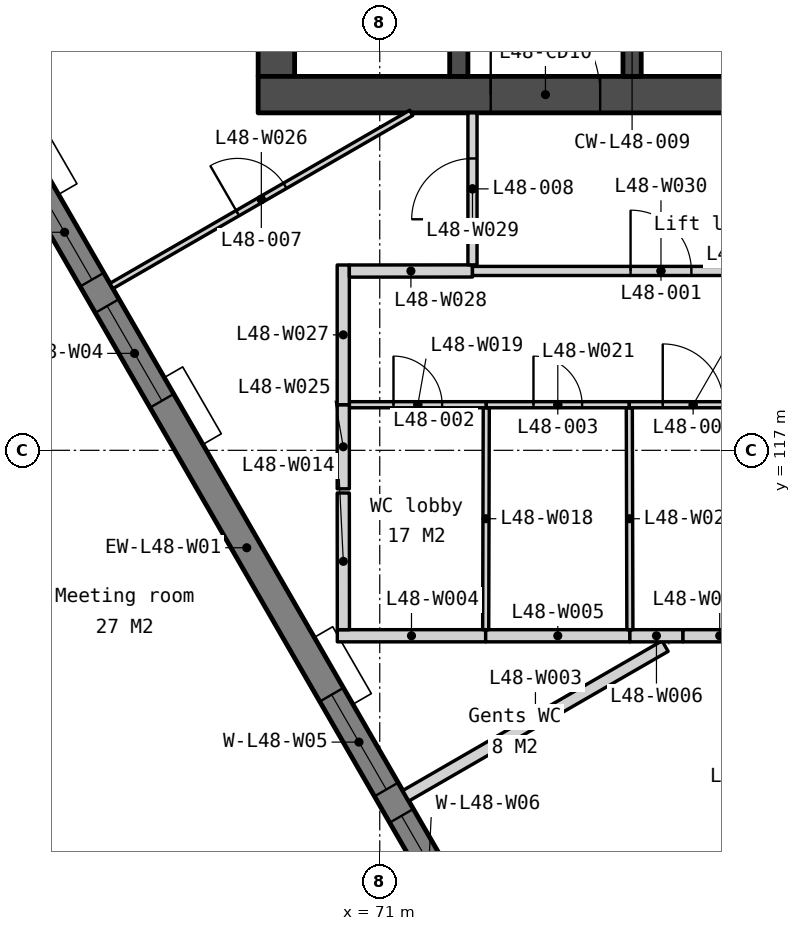
"""IFC4 building model, lengths in metres.
Left out: names, types, materials, properties, quantities, classifications, styles, units other than length and angle.
Written with IfcOpenShell. Run it as: python <this file> out.ifc"""

import sys

from ifc_helpers import new_model, si_unit, direction, frame, frame_2d, origin, place, context, subcontext, project, spatial, polyline, rectangle, outline, extrude, element, fill, save


model = new_model("IFC4")
c1 = context("Model", 3, precision=1e-05, world=origin(), true_north=direction((0.0, 1.0)))
c2 = subcontext(c1, "Body", "Model", "MODEL_VIEW")
j1 = project(units=[si_unit("LENGTHUNIT", "METRE"), si_unit("PLANEANGLEUNIT", "RADIAN")], contexts=[c1])
p1 = place(None, origin())
s1 = spatial("IfcSite", under=j1, at=p1, CompositionType="ELEMENT")
p2 = place(p1, origin())
s2 = spatial("IfcBuilding", under=s1, at=p2, CompositionType="ELEMENT")
p3 = place(p2, frame((0.0, 0.0, 191.9)))
s3 = spatial("IfcBuildingStorey", under=s2, at=p3, CompositionType="ELEMENT", Elevation=191.9)
p4 = place(p3, frame((69.3, 133.95, 0.0), z_axis=(0.0, 0.0, 1.0), x_axis=(0.0, -1.0, 0.0)))
e1 = element("IfcWall", 1, at=p4, inside=s3, PredefinedType="SOLIDWALL", context=c2, shape_type="SweptSolid", body=[
    extrude(rectangle(XDim=10.8, YDim=0.6, at=frame_2d((5.4, 0.0))), origin(), (0.0, 0.0, 1.0), 3.75),
])
p5 = place(p3, frame((69.0, 122.85, 0.0), z_axis=(0.0, 0.0, 1.0), x_axis=(1.0, 0.0, 0.0)))
e2 = element("IfcWall", 2, at=p5, inside=s3, PredefinedType="SOLIDWALL", context=c2, shape_type="SweptSolid", body=[
    extrude(rectangle(XDim=22.0, YDim=0.6, at=frame_2d((11.0, 0.0))), origin(), (0.0, 0.0, 1.0), 3.75),
])
p6 = place(p5, frame((16.375, 0.0, 0.0)))
e3 = element("IfcOpeningElement", 3, at=p6, cuts=e2, PredefinedType="OPENING", context=c2, shape_type="SweptSolid", body=[
    extrude(rectangle(XDim=1.8, YDim=2.1, at=frame_2d((0.9, 1.05))), frame((0.0, 0.31, 0.0), z_axis=(0.0, -1.0, 0.0), x_axis=(1.0, 0.0, 0.0)), (0.0, 0.0, 1.0), 0.62),
])
p7 = place(p5, frame((3.825, 0.0, 0.0)))
e4 = element("IfcOpeningElement", 4, at=p7, cuts=e2, PredefinedType="OPENING", context=c2, shape_type="SweptSolid", body=[
    extrude(rectangle(XDim=1.8, YDim=2.1, at=frame_2d((0.9, 1.05))), frame((0.0, 0.31, 0.0), z_axis=(0.0, -1.0, 0.0), x_axis=(1.0, 0.0, 0.0)), (0.0, 0.0, 1.0), 0.62),
])
p8 = place(p5, frame((12.85, 0.0, 0.0)))
e5 = element("IfcOpeningElement", 5, at=p8, cuts=e2, PredefinedType="OPENING", context=c2, shape_type="SweptSolid", body=[
    extrude(rectangle(XDim=1.5, YDim=2.1, at=frame_2d((0.75, 1.05))), frame((0.0, 0.31, 0.0), z_axis=(0.0, -1.0, 0.0), x_axis=(1.0, 0.0, 0.0)), (0.0, 0.0, 1.0), 0.62),
])
p9 = place(p3, frame((72.3, 133.95, 0.0), z_axis=(0.0, 0.0, 1.0), x_axis=(0.0, -1.0, 0.0)))
e6 = element("IfcWall", 6, at=p9, inside=s3, PredefinedType="SOLIDWALL", context=c2, shape_type="SweptSolid", body=[
    extrude(rectangle(XDim=10.8, YDim=0.3, at=frame_2d((5.4, 0.0))), origin(), (0.0, 0.0, 1.0), 3.75),
])
p10 = place(p9, frame((6.95, 0.0, 0.0)))
e7 = element("IfcOpeningElement", 7, at=p10, cuts=e6, PredefinedType="OPENING", context=c2, shape_type="SweptSolid", body=[
    extrude(rectangle(XDim=1.1, YDim=2.1, at=frame_2d((0.55, 1.05))), frame((0.0, 0.16, 0.0), z_axis=(0.0, -1.0, 0.0), x_axis=(1.0, 0.0, 0.0)), (0.0, 0.0, 1.0), 0.32),
])
p11 = place(p9, frame((9.35, 0.0, 0.0)))
e8 = element("IfcOpeningElement", 8, at=p11, cuts=e6, PredefinedType="OPENING", context=c2, shape_type="SweptSolid", body=[
    extrude(rectangle(XDim=0.9, YDim=2.1, at=frame_2d((0.45, 1.05))), frame((0.0, 0.16, 0.0), z_axis=(0.0, -1.0, 0.0), x_axis=(1.0, 0.0, 0.0)), (0.0, 0.0, 1.0), 0.32),
])
p12 = place(p9, frame((5.1, 0.0, 0.0)))
e9 = element("IfcOpeningElement", 9, at=p12, cuts=e6, PredefinedType="OPENING", context=c2, shape_type="SweptSolid", body=[
    extrude(rectangle(XDim=1.0, YDim=2.1, at=frame_2d((0.5, 1.05))), frame((0.0, 0.16, 0.0), z_axis=(0.0, -1.0, 0.0), x_axis=(1.0, 0.0, 0.0)), (0.0, 0.0, 1.0), 0.32),
])
p13 = place(p3, frame((75.15, 125.7, 0.0), z_axis=(0.0, 0.0, 1.0), x_axis=(0.0, -1.0, 0.0)))
e10 = element("IfcWall", 10, at=p13, inside=s3, PredefinedType="SOLIDWALL", context=c2, shape_type="SweptSolid", body=[
    extrude(rectangle(XDim=2.55, YDim=0.3, at=frame_2d((1.275, 0.0))), origin(), (0.0, 0.0, 1.0), 3.75),
])
p14 = place(p3, frame((59.13, 132.168, -0.15), z_axis=(0.0, 0.0, 1.0), x_axis=(0.500002199942, -0.866024133644, 0.0)))
e11 = element("IfcWall", 11, at=p14, inside=s3, PredefinedType="SOLIDWALL", context=c2, shape_type="SweptSolid", body=[
    extrude(outline(polyline([(38.729, 0.0), (38.729, 3.9), (0.0, 3.9), (0.0, 0.0), (38.729, 0.0)])), frame((0.0, 0.225, 0.0), z_axis=(0.0, -1.0, 0.0), x_axis=(1.0, 0.0, 0.0)), (0.0, 0.0, 1.0), 0.45),
])
p15 = place(p14, frame((2.791, 0.0, 0.95)))
e12 = element("IfcOpeningElement", 12, at=p15, cuts=e11, PredefinedType="OPENING", context=c2, shape_type="SweptSolid", body=[
    extrude(rectangle(XDim=1.8, YDim=2.2, at=frame_2d((0.9, 1.1))), frame((0.0, 0.235, 0.0), z_axis=(0.0, -1.0, 0.0), x_axis=(1.0, 0.0, 0.0)), (0.0, 0.0, 1.0), 0.47),
])
p16 = place(p14, frame((5.091, 0.0, 0.95)))
e13 = element("IfcOpeningElement", 13, at=p16, cuts=e11, PredefinedType="OPENING", context=c2, shape_type="SweptSolid", body=[
    extrude(rectangle(XDim=1.8, YDim=2.2, at=frame_2d((0.9, 1.1))), frame((0.0, 0.235, 0.0), z_axis=(0.0, -1.0, 0.0), x_axis=(1.0, 0.0, 0.0)), (0.0, 0.0, 1.0), 0.47),
])
p17 = place(p14, frame((12.473, 0.0, 0.95)))
e14 = element("IfcOpeningElement", 14, at=p17, cuts=e11, PredefinedType="OPENING", context=c2, shape_type="SweptSolid", body=[
    extrude(rectangle(XDim=1.8, YDim=2.2, at=frame_2d((0.9, 1.1))), frame((0.0, 0.235, 0.0), z_axis=(0.0, -1.0, 0.0), x_axis=(1.0, 0.0, 0.0)), (0.0, 0.0, 1.0), 0.47),
])
p18 = place(p14, frame((14.773, 0.0, 0.95)))
e15 = element("IfcOpeningElement", 15, at=p18, cuts=e11, PredefinedType="OPENING", context=c2, shape_type="SweptSolid", body=[
    extrude(rectangle(XDim=1.8, YDim=2.2, at=frame_2d((0.9, 1.1))), frame((0.0, 0.235, 0.0), z_axis=(0.0, -1.0, 0.0), x_axis=(1.0, 0.0, 0.0)), (0.0, 0.0, 1.0), 0.47),
])
p19 = place(p14, frame((22.156, 0.0, 0.95)))
e16 = element("IfcOpeningElement", 16, at=p19, cuts=e11, PredefinedType="OPENING", context=c2, shape_type="SweptSolid", body=[
    extrude(rectangle(XDim=1.8, YDim=2.2, at=frame_2d((0.9, 1.1))), frame((0.0, 0.235, 0.0), z_axis=(0.0, -1.0, 0.0), x_axis=(1.0, 0.0, 0.0)), (0.0, 0.0, 1.0), 0.47),
])
p20 = place(p14, frame((24.456, 0.0, 0.95)))
e17 = element("IfcOpeningElement", 17, at=p20, cuts=e11, PredefinedType="OPENING", context=c2, shape_type="SweptSolid", body=[
    extrude(rectangle(XDim=1.8, YDim=2.2, at=frame_2d((0.9, 1.1))), frame((0.0, 0.235, 0.0), z_axis=(0.0, -1.0, 0.0), x_axis=(1.0, 0.0, 0.0)), (0.0, 0.0, 1.0), 0.47),
])
p21 = place(p14, frame((31.838, 0.0, 0.95)))
e18 = element("IfcOpeningElement", 18, at=p21, cuts=e11, PredefinedType="OPENING", context=c2, shape_type="SweptSolid", body=[
    extrude(rectangle(XDim=1.8, YDim=2.2, at=frame_2d((0.9, 1.1))), frame((0.0, 0.235, 0.0), z_axis=(0.0, -1.0, 0.0), x_axis=(1.0, 0.0, 0.0)), (0.0, 0.0, 1.0), 0.47),
])
p22 = place(p14, frame((34.138, 0.0, 0.95)))
e19 = element("IfcOpeningElement", 19, at=p22, cuts=e11, PredefinedType="OPENING", context=c2, shape_type="SweptSolid", body=[
    extrude(rectangle(XDim=1.8, YDim=2.2, at=frame_2d((0.9, 1.1))), frame((0.0, 0.235, 0.0), z_axis=(0.0, -1.0, 0.0), x_axis=(1.0, 0.0, 0.0)), (0.0, 0.0, 1.0), 0.47),
])
p23 = place(p3, frame((73.849, 107.125, 0.0), z_axis=(0.0, 0.0, 1.0), x_axis=(0.866035511351, 0.499982492772, 0.0)))
e20 = element("IfcWall", 20, at=p23, inside=s3, PredefinedType="PARTITIONING", context=c2, shape_type="SweptSolid", body=[
    extrude(rectangle(XDim=7.016, YDim=0.1, at=frame_2d((3.508, 0.0))), origin(), (0.0, 0.0, 1.0), 3.75),
])
p24 = place(p3, frame((71.428, 111.318, 0.0), z_axis=(0.0, 0.0, 1.0), x_axis=(0.86601964755, 0.500009969958, 0.0)))
e21 = element("IfcWall", 21, at=p24, inside=s3, PredefinedType="PARTITIONING", context=c2, shape_type="SweptSolid", body=[
    extrude(rectangle(XDim=4.925, YDim=0.2, at=frame_2d((2.462, 0.0))), origin(), (0.0, 0.0, 1.0), 3.75),
])
p25 = place(p3, frame((70.302, 113.95, 0.0), z_axis=(0.0, 0.0, 1.0), x_axis=(1.0, 0.0, 0.0)))
e22 = element("IfcWall", 22, at=p25, inside=s3, PredefinedType="PARTITIONING", context=c2, shape_type="SweptSolid", body=[
    extrude(rectangle(XDim=2.44, YDim=0.2, at=frame_2d((1.22, 0.0))), origin(), (0.0, 0.0, 1.0), 3.75),
])
p26 = place(p3, frame((72.742, 113.95, 0.0), z_axis=(0.0, 0.0, 1.0), x_axis=(1.0, 0.0, 0.0)))
e23 = element("IfcWall", 23, at=p26, inside=s3, PredefinedType="PARTITIONING", context=c2, shape_type="SweptSolid", body=[
    extrude(rectangle(XDim=2.372, YDim=0.2, at=frame_2d((1.186, 0.0))), origin(), (0.0, 0.0, 1.0), 3.75),
])
p27 = place(p3, frame((75.114, 113.95, 0.0), z_axis=(0.0, 0.0, 1.0), x_axis=(1.0, 0.0, 0.0)))
e24 = element("IfcWall", 24, at=p27, inside=s3, PredefinedType="PARTITIONING", context=c2, shape_type="SweptSolid", body=[
    extrude(rectangle(XDim=0.873, YDim=0.2, at=frame_2d((0.437, 0.0))), origin(), (0.0, 0.0, 1.0), 3.75),
])
p28 = place(p3, frame((75.987, 113.95, 0.0), z_axis=(0.0, 0.0, 1.0), x_axis=(1.0, 0.0, 0.0)))
e25 = element("IfcWall", 25, at=p28, inside=s3, PredefinedType="PARTITIONING", context=c2, shape_type="SweptSolid", body=[
    extrude(rectangle(XDim=1.207, YDim=0.2, at=frame_2d((0.604, 0.0))), origin(), (0.0, 0.0, 1.0), 3.75),
])
p29 = place(p3, frame((70.402, 114.05, 0.0), z_axis=(0.0, 0.0, 1.0), x_axis=(-0.000868809403, 0.999999622585, 0.0)))
e26 = element("IfcWall", 26, at=p29, inside=s3, PredefinedType="PARTITIONING", context=c2, shape_type="SweptSolid", body=[
    extrude(rectangle(XDim=2.248, YDim=0.2, at=frame_2d((1.124, 0.0))), origin(), (0.0, 0.0, 1.0), 3.75),
])
p30 = place(p3, frame((72.742, 114.05, 0.0), z_axis=(0.0, 0.0, 1.0), x_axis=(0.002675575707, 0.999996420641, 0.0)))
e27 = element("IfcWall", 27, at=p30, inside=s3, PredefinedType="PARTITIONING", context=c2, shape_type="SweptSolid", body=[
    extrude(rectangle(XDim=3.65, YDim=0.1, at=frame_2d((1.825, 0.0))), origin(), (0.0, 0.0, 1.0), 3.75),
])
p31 = place(p3, frame((70.5, 117.75, 0.0), z_axis=(0.0, 0.0, 1.0), x_axis=(1.0, 0.0, 0.0)))
e28 = element("IfcWall", 28, at=p31, inside=s3, PredefinedType="PARTITIONING", context=c2, shape_type="SweptSolid", body=[
    extrude(rectangle(XDim=2.252, YDim=0.1, at=frame_2d((1.126, 0.0))), origin(), (0.0, 0.0, 1.0), 3.75),
])
p32 = place(p31, frame((0.726, 0.0, 0.0)))
e29 = element("IfcOpeningElement", 29, at=p32, cuts=e28, PredefinedType="OPENING", context=c2, shape_type="SweptSolid", body=[
    extrude(rectangle(XDim=0.8, YDim=2.1, at=frame_2d((0.4, 1.05))), frame((0.0, 0.06, 0.0), z_axis=(0.0, -1.0, 0.0), x_axis=(1.0, 0.0, 0.0)), (0.0, 0.0, 1.0), 0.12),
])
p33 = place(p3, frame((75.114, 114.05, 0.0), z_axis=(0.0, 0.0, 1.0), x_axis=(-0.002608686776, 0.999996597371, 0.0)))
e30 = element("IfcWall", 30, at=p33, inside=s3, PredefinedType="PARTITIONING", context=c2, shape_type="SweptSolid", body=[
    extrude(rectangle(XDim=3.65, YDim=0.1, at=frame_2d((1.825, 0.0))), origin(), (0.0, 0.0, 1.0), 3.75),
])
p34 = place(p3, frame((72.752, 117.75, 0.0), z_axis=(0.0, 0.0, 1.0), x_axis=(1.0, 0.0, 0.0)))
e31 = element("IfcWall", 31, at=p34, inside=s3, PredefinedType="PARTITIONING", context=c2, shape_type="SweptSolid", body=[
    extrude(rectangle(XDim=2.352, YDim=0.1, at=frame_2d((1.176, 0.0))), origin(), (0.0, 0.0, 1.0), 3.75),
])
p35 = place(p34, frame((0.776, 0.0, 0.0)))
e32 = element("IfcOpeningElement", 32, at=p35, cuts=e31, PredefinedType="OPENING", context=c2, shape_type="SweptSolid", body=[
    extrude(rectangle(XDim=0.8, YDim=2.1, at=frame_2d((0.4, 1.05))), frame((0.0, 0.06, 0.0), z_axis=(0.0, -1.0, 0.0), x_axis=(1.0, 0.0, 0.0)), (0.0, 0.0, 1.0), 0.12),
])
p36 = place(p3, frame((75.104, 117.75, 0.0), z_axis=(0.0, 0.0, 1.0), x_axis=(1.0, 0.0, 0.0)))
e33 = element("IfcWall", 33, at=p36, inside=s3, PredefinedType="PARTITIONING", context=c2, shape_type="SweptSolid", body=[
    extrude(rectangle(XDim=2.1, YDim=0.1, at=frame_2d((1.05, 0.0))), origin(), (0.0, 0.0, 1.0), 3.75),
])
p37 = place(p36, frame((0.55, 0.0, 0.0)))
e34 = element("IfcOpeningElement", 34, at=p37, cuts=e33, PredefinedType="OPENING", context=c2, shape_type="SweptSolid", body=[
    extrude(rectangle(XDim=1.0, YDim=2.1, at=frame_2d((0.5, 1.05))), frame((0.0, 0.06, 0.0), z_axis=(0.0, -1.0, 0.0), x_axis=(1.0, 0.0, 0.0)), (0.0, 0.0, 1.0), 0.12),
])
p38 = place(p3, frame((70.4, 116.367, 0.0), z_axis=(0.0, 0.0, 1.0), x_axis=(0.0, 1.0, 0.0)))
e35 = element("IfcWall", 35, at=p38, inside=s3, PredefinedType="PARTITIONING", context=c2, shape_type="SweptSolid", body=[
    extrude(rectangle(XDim=1.383, YDim=0.2, at=frame_2d((0.692, 0.0))), origin(), (0.0, 0.0, 1.0), 3.75),
])
p39 = place(p3, frame((66.587, 119.703, 0.0), z_axis=(0.0, 0.0, 1.0), x_axis=(0.866023511746, 0.500003277092, 0.0)))
e36 = element("IfcWall", 36, at=p39, inside=s3, PredefinedType="PARTITIONING", context=c2, shape_type="SweptSolid", body=[
    extrude(rectangle(XDim=5.694, YDim=0.1, at=frame_2d((2.847, 0.0))), origin(), (0.0, 0.0, 1.0), 3.75),
])
p40 = place(p39, frame((2.397, 0.0, 0.0)))
e37 = element("IfcOpeningElement", 37, at=p40, cuts=e36, PredefinedType="OPENING", context=c2, shape_type="SweptSolid", body=[
    extrude(rectangle(XDim=0.9, YDim=2.1, at=frame_2d((0.45, 1.05))), frame((0.0, 0.06, 0.0), z_axis=(0.0, -1.0, 0.0), x_axis=(1.0, 0.0, 0.0)), (0.0, 0.0, 1.0), 0.12),
])
p41 = place(p3, frame((70.4, 117.75, 0.0), z_axis=(0.0, 0.0, 1.0), x_axis=(0.0, 1.0, 0.0)))
e38 = element("IfcWall", 38, at=p41, inside=s3, PredefinedType="PARTITIONING", context=c2, shape_type="SweptSolid", body=[
    extrude(rectangle(XDim=2.298, YDim=0.2, at=frame_2d((1.149, 0.0))), origin(), (0.0, 0.0, 1.0), 3.75),
])
p42 = place(p3, frame((70.5, 119.948, 0.0), z_axis=(0.0, 0.0, 1.0), x_axis=(0.999999534819, 0.00096455224, 0.0)))
e39 = element("IfcWall", 39, at=p42, inside=s3, PredefinedType="PARTITIONING", context=c2, shape_type="SweptSolid", body=[
    extrude(rectangle(XDim=2.025, YDim=0.2, at=frame_2d((1.012, 0.0))), origin(), (0.0, 0.0, 1.0), 3.75),
])
p43 = place(p3, frame((72.525, 120.05, 0.0), z_axis=(0.0, 0.0, 1.0), x_axis=(0.0, 1.0, 0.0)))
e40 = element("IfcWall", 40, at=p43, inside=s3, PredefinedType="PARTITIONING", context=c2, shape_type="SweptSolid", body=[
    extrude(rectangle(XDim=2.5, YDim=0.15, at=frame_2d((1.25, 0.0))), origin(), (0.0, 0.0, 1.0), 3.75),
])
p44 = place(p43, frame((0.75, 0.0, 0.0)))
e41 = element("IfcOpeningElement", 41, at=p44, cuts=e40, PredefinedType="OPENING", context=c2, shape_type="SweptSolid", body=[
    extrude(rectangle(XDim=1.0, YDim=2.1, at=frame_2d((0.5, 1.05))), frame((0.0, 0.085, 0.0), z_axis=(0.0, -1.0, 0.0), x_axis=(1.0, 0.0, 0.0)), (0.0, 0.0, 1.0), 0.17),
])
p45 = place(p3, frame((72.525, 119.95, 0.0), z_axis=(0.0, 0.0, 1.0), x_axis=(1.0, 0.0, 0.0)))
e42 = element("IfcWall", 42, at=p45, inside=s3, PredefinedType="PARTITIONING", context=c2, shape_type="SweptSolid", body=[
    extrude(rectangle(XDim=6.2, YDim=0.15, at=frame_2d((3.1, 0.0))), origin(), (0.0, 0.0, 1.0), 3.75),
])
p46 = place(p45, frame((2.6, 0.0, 0.0)))
e43 = element("IfcOpeningElement", 43, at=p46, cuts=e42, PredefinedType="OPENING", context=c2, shape_type="SweptSolid", body=[
    extrude(rectangle(XDim=1.0, YDim=2.1, at=frame_2d((0.5, 1.05))), frame((0.0, 0.085, 0.0), z_axis=(0.0, -1.0, 0.0), x_axis=(1.0, 0.0, 0.0)), (0.0, 0.0, 1.0), 0.17),
])
p47 = place(p7, origin())
e44 = element("IfcDoor", 44, at=p47, inside=s3, OperationType="DOUBLE_DOOR_DOUBLE_SWING", PredefinedType="DOOR", context=c2, shape_type="SweptSolid", body=[
    extrude(rectangle(XDim=1.8, YDim=2.1, at=frame_2d((0.9, 1.05))), frame((0.0, 0.025, 0.0), z_axis=(0.0, -1.0, 0.0), x_axis=(1.0, 0.0, 0.0)), (0.0, 0.0, 1.0), 0.05),
])
fill(e4, e44)
p48 = place(p17, origin())
e45 = element("IfcWindow", 45, at=p48, inside=s3, PartitioningType="SINGLE_PANEL", PredefinedType="WINDOW", context=c2, shape_type="SweptSolid", body=[
    extrude(rectangle(XDim=1.8, YDim=2.2, at=frame_2d((0.9, 1.1))), frame((0.0, 0.03, 0.0), z_axis=(0.0, -1.0, 0.0), x_axis=(1.0, 0.0, 0.0)), (0.0, 0.0, 1.0), 0.06),
])
fill(e14, e45)
p49 = place(p18, origin())
e46 = element("IfcWindow", 46, at=p49, inside=s3, PartitioningType="SINGLE_PANEL", PredefinedType="WINDOW", context=c2, shape_type="SweptSolid", body=[
    extrude(rectangle(XDim=1.8, YDim=2.2, at=frame_2d((0.9, 1.1))), frame((0.0, 0.03, 0.0), z_axis=(0.0, -1.0, 0.0), x_axis=(1.0, 0.0, 0.0)), (0.0, 0.0, 1.0), 0.06),
])
fill(e15, e46)
p50 = place(p19, origin())
e47 = element("IfcWindow", 47, at=p50, inside=s3, PartitioningType="SINGLE_PANEL", PredefinedType="WINDOW", context=c2, shape_type="SweptSolid", body=[
    extrude(rectangle(XDim=1.8, YDim=2.2, at=frame_2d((0.9, 1.1))), frame((0.0, 0.03, 0.0), z_axis=(0.0, -1.0, 0.0), x_axis=(1.0, 0.0, 0.0)), (0.0, 0.0, 1.0), 0.06),
])
fill(e16, e47)
p51 = place(p20, origin())
e48 = element("IfcWindow", 48, at=p51, inside=s3, PartitioningType="SINGLE_PANEL", PredefinedType="WINDOW", context=c2, shape_type="SweptSolid", body=[
    extrude(rectangle(XDim=1.8, YDim=2.2, at=frame_2d((0.9, 1.1))), frame((0.0, 0.03, 0.0), z_axis=(0.0, -1.0, 0.0), x_axis=(1.0, 0.0, 0.0)), (0.0, 0.0, 1.0), 0.06),
])
fill(e17, e48)
p52 = place(p46, origin())
e49 = element("IfcDoor", 49, at=p52, inside=s3, OperationType="SINGLE_SWING_LEFT", PredefinedType="DOOR", context=c2, shape_type="SweptSolid", body=[
    extrude(rectangle(XDim=1.0, YDim=2.1, at=frame_2d((0.5, 1.05))), frame((0.0, 0.025, 0.0), z_axis=(0.0, -1.0, 0.0), x_axis=(1.0, 0.0, 0.0)), (0.0, 0.0, 1.0), 0.05),
])
fill(e43, e49)
p53 = place(p32, origin())
e50 = element("IfcDoor", 50, at=p53, inside=s3, OperationType="SINGLE_SWING_LEFT", PredefinedType="DOOR", context=c2, shape_type="SweptSolid", body=[
    extrude(rectangle(XDim=0.8, YDim=2.1, at=frame_2d((0.4, 1.05))), frame((0.0, 0.025, 0.0), z_axis=(0.0, -1.0, 0.0), x_axis=(1.0, 0.0, 0.0)), (0.0, 0.0, 1.0), 0.05),
])
fill(e29, e50)
p54 = place(p35, origin())
e51 = element("IfcDoor", 51, at=p54, inside=s3, OperationType="SINGLE_SWING_LEFT", PredefinedType="DOOR", context=c2, shape_type="SweptSolid", body=[
    extrude(rectangle(XDim=0.8, YDim=2.1, at=frame_2d((0.4, 1.05))), frame((0.0, 0.025, 0.0), z_axis=(0.0, -1.0, 0.0), x_axis=(1.0, 0.0, 0.0)), (0.0, 0.0, 1.0), 0.05),
])
fill(e32, e51)
p55 = place(p37, origin())
e52 = element("IfcDoor", 52, at=p55, inside=s3, OperationType="SINGLE_SWING_LEFT", PredefinedType="DOOR", context=c2, shape_type="SweptSolid", body=[
    extrude(rectangle(XDim=1.0, YDim=2.1, at=frame_2d((0.5, 1.05))), frame((0.0, 0.025, 0.0), z_axis=(0.0, -1.0, 0.0), x_axis=(1.0, 0.0, 0.0)), (0.0, 0.0, 1.0), 0.05),
])
fill(e34, e52)
p56 = place(p40, origin())
e53 = element("IfcDoor", 53, at=p56, inside=s3, OperationType="SINGLE_SWING_LEFT", PredefinedType="DOOR", context=c2, shape_type="SweptSolid", body=[
    extrude(rectangle(XDim=0.9, YDim=2.1, at=frame_2d((0.45, 1.05))), frame((0.0, 0.025, 0.0), z_axis=(0.0, -1.0, 0.0), x_axis=(1.0, 0.0, 0.0)), (0.0, 0.0, 1.0), 0.05),
])
fill(e37, e53)
p57 = place(p44, origin())
e54 = element("IfcDoor", 54, at=p57, inside=s3, OperationType="SINGLE_SWING_LEFT", PredefinedType="DOOR", context=c2, shape_type="SweptSolid", body=[
    extrude(rectangle(XDim=1.0, YDim=2.1, at=frame_2d((0.5, 1.05))), frame((0.0, 0.025, 0.0), z_axis=(0.0, -1.0, 0.0), x_axis=(1.0, 0.0, 0.0)), (0.0, 0.0, 1.0), 0.05),
])
fill(e41, e54)
save(model, sys.argv[1])
